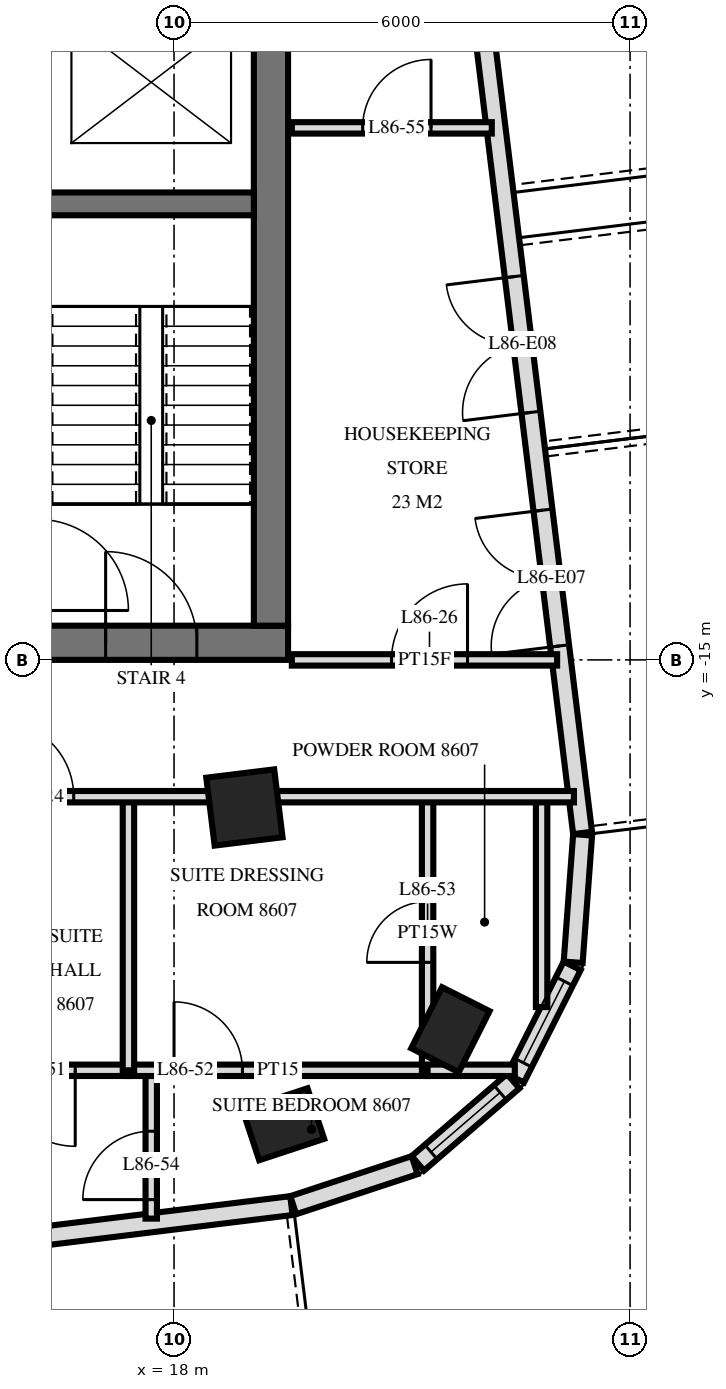
"""IFC4 building model, lengths in metres.
Left out: names, types, materials, properties, quantities, classifications, styles, units other than length and angle.
Written with IfcOpenShell. Run it as: python <this file> out.ifc"""

import sys

from ifc_helpers import new_model, si_unit, direction, frame, frame_2d, origin, origin_2d, place, context, subcontext, project, spatial, rectangle, extrude, element, fill, save


model = new_model("IFC4")
c1 = context("Model", 3, precision=1e-05, world=origin(), true_north=direction((0.0, 1.0)))
c2 = subcontext(c1, "Body", "Model", "MODEL_VIEW")
j1 = project(units=[si_unit("LENGTHUNIT", "METRE"), si_unit("PLANEANGLEUNIT", "RADIAN")], contexts=[c1])
p1 = place(None, origin())
s1 = spatial("IfcSite", under=j1, at=p1, CompositionType="ELEMENT")
p2 = place(p1, origin())
s2 = spatial("IfcBuilding", under=s1, at=p2, CompositionType="ELEMENT")
p3 = place(p2, frame((0.0, 0.0, 326.6)))
s3 = spatial("IfcBuildingStorey", under=s2, at=p3, CompositionType="ELEMENT", Elevation=326.6)
p4 = place(p3, frame((18.926, -16.942, 0.0), z_axis=(0.0, 0.0, 1.0), x_axis=(0.992546151641, 0.121869343405, 0.0)))
e1 = element("IfcColumn", 1, at=p4, inside=s3, PredefinedType="COLUMN", context=c2, shape_type="SweptSolid", body=[
    extrude(rectangle(XDim=0.9, YDim=0.9, at=origin_2d()), origin(), (0.0, 0.0, 1.0), 4.0),
])
for number, where, z_axis, x_axis in (
    (2, (19.438, -21.11, 0.0), (0.0, 0.0, 1.0), (0.95, 0.313, 0.0)),
    (3, (21.636, -19.866, 0.0), (0.0, 0.0, 1.0), (0.45, 0.893, 0.0)),
):
    element("IfcColumn", number, at=place(p3, frame(where, z_axis=z_axis, x_axis=x_axis)), inside=s3, PredefinedType="COLUMN", context=c2, shape_type="SweptSolid", body=[
        extrude(rectangle(XDim=0.9, YDim=0.7, at=origin_2d()), origin(), (0.0, 0.0, 1.0), 4.0),
    ])
p5 = place(p3, frame((10.0, -14.775, 0.0), z_axis=(0.0, 0.0, 1.0), x_axis=(1.0, 0.0, 0.0)))
e4 = element("IfcWall", 4, at=p5, inside=s3, PredefinedType="SHEAR", context=c2, shape_type="SweptSolid", body=[
    extrude(rectangle(XDim=9.5, YDim=0.45, at=frame_2d((4.75, 0.0))), origin(), (0.0, 0.0, 1.0), 4.0),
])
p6 = place(p5, frame((7.1, 0.0, 0.0)))
e5 = element("IfcOpeningElement", 5, at=p6, cuts=e4, PredefinedType="OPENING", context=c2, shape_type="SweptSolid", body=[
    extrude(rectangle(XDim=1.2, YDim=2.1, at=frame_2d((0.6, 1.05))), frame((0.0, 0.235, 0.0), z_axis=(0.0, -1.0, 0.0), x_axis=(1.0, 0.0, 0.0)), (0.0, 0.0, 1.0), 0.47),
])
p7 = place(p5, frame((4.15, 0.0, 0.0)))
e6 = element("IfcOpeningElement", 6, at=p7, cuts=e4, PredefinedType="OPENING", context=c2, shape_type="SweptSolid", body=[
    extrude(rectangle(XDim=1.1, YDim=2.1, at=frame_2d((0.55, 1.05))), frame((0.0, 0.235, 0.0), z_axis=(0.0, -1.0, 0.0), x_axis=(1.0, 0.0, 0.0)), (0.0, 0.0, 1.0), 0.47),
])
p8 = place(p3, frame((19.275, -14.55, 0.0), z_axis=(0.0, 0.0, 1.0), x_axis=(0.0, 1.0, 0.0)))
e7 = element("IfcWall", 7, at=p8, inside=s3, PredefinedType="SHEAR", context=c2, shape_type="SweptSolid", body=[
    extrude(rectangle(XDim=14.1, YDim=0.45, at=frame_2d((7.05, 0.0))), origin(), (0.0, 0.0, 1.0), 4.0),
])
p9 = place(p3, frame((10.35, -9.0, 0.0), z_axis=(0.0, 0.0, 1.0), x_axis=(1.0, 0.0, 0.0)))
e8 = element("IfcWall", 8, at=p9, inside=s3, PredefinedType="SHEAR", context=c2, shape_type="SweptSolid", body=[
    extrude(rectangle(XDim=8.7, YDim=0.3, at=frame_2d((4.35, 0.0))), origin(), (0.0, 0.0, 1.0), 4.0),
])
p10 = place(p9, frame((3.8, 0.0, 0.0)))
e9 = element("IfcOpeningElement", 9, at=p10, cuts=e8, PredefinedType="OPENING", context=c2, shape_type="SweptSolid", body=[
    extrude(rectangle(XDim=1.1, YDim=2.1, at=frame_2d((0.55, 1.05))), frame((0.0, 0.16, 0.0), z_axis=(0.0, -1.0, 0.0), x_axis=(1.0, 0.0, 0.0)), (0.0, 0.0, 1.0), 0.32),
])
p11 = place(p3, frame((-16.138, -26.561, 0.0), z_axis=(0.0, 0.0, 1.0), x_axis=(0.992546726876, 0.121864658405, 0.0)))
e10 = element("IfcWall", 10, at=p11, inside=s3, PredefinedType="SOLIDWALL", context=c2, shape_type="SweptSolid", body=[
    extrude(rectangle(XDim=35.951, YDim=0.25, at=frame_2d((17.975, 0.0))), origin(), (0.0, 0.0, 1.0), 3.72),
])
p12 = place(p11, frame((0.575, 0.0, 0.0)))
e11 = element("IfcOpeningElement", 11, at=p12, cuts=e10, PredefinedType="OPENING", context=c2, shape_type="SweptSolid", body=[
    extrude(rectangle(XDim=1.8, YDim=2.4, at=frame_2d((0.9, 1.2))), frame((0.0, 0.135, 0.0), z_axis=(0.0, -1.0, 0.0), x_axis=(1.0, 0.0, 0.0)), (0.0, 0.0, 1.0), 0.27),
])
p13 = place(p11, frame((6.576, 0.0, 0.0)))
e12 = element("IfcOpeningElement", 12, at=p13, cuts=e10, PredefinedType="OPENING", context=c2, shape_type="SweptSolid", body=[
    extrude(rectangle(XDim=1.8, YDim=2.4, at=frame_2d((0.9, 1.2))), frame((0.0, 0.135, 0.0), z_axis=(0.0, -1.0, 0.0), x_axis=(1.0, 0.0, 0.0)), (0.0, 0.0, 1.0), 0.27),
])
p14 = place(p11, frame((12.575, 0.0, 0.0)))
e13 = element("IfcOpeningElement", 13, at=p14, cuts=e10, PredefinedType="OPENING", context=c2, shape_type="SweptSolid", body=[
    extrude(rectangle(XDim=1.8, YDim=2.4, at=frame_2d((0.9, 1.2))), frame((0.0, 0.135, 0.0), z_axis=(0.0, -1.0, 0.0), x_axis=(1.0, 0.0, 0.0)), (0.0, 0.0, 1.0), 0.27),
])
p15 = place(p11, frame((18.575, 0.0, 0.0)))
e14 = element("IfcOpeningElement", 14, at=p15, cuts=e10, PredefinedType="OPENING", context=c2, shape_type="SweptSolid", body=[
    extrude(rectangle(XDim=1.8, YDim=2.4, at=frame_2d((0.9, 1.2))), frame((0.0, 0.135, 0.0), z_axis=(0.0, -1.0, 0.0), x_axis=(1.0, 0.0, 0.0)), (0.0, 0.0, 1.0), 0.27),
])
p16 = place(p11, frame((22.528, 0.0, 0.0)))
e15 = element("IfcOpeningElement", 15, at=p16, cuts=e10, PredefinedType="OPENING", context=c2, shape_type="SweptSolid", body=[
    extrude(rectangle(XDim=1.2, YDim=2.4, at=frame_2d((0.6, 1.2))), frame((0.0, 0.135, 0.0), z_axis=(0.0, -1.0, 0.0), x_axis=(1.0, 0.0, 0.0)), (0.0, 0.0, 1.0), 0.27),
])
p17 = place(p11, frame((25.923, 0.0, 0.0)))
e16 = element("IfcOpeningElement", 16, at=p17, cuts=e10, PredefinedType="OPENING", context=c2, shape_type="SweptSolid", body=[
    extrude(rectangle(XDim=1.8, YDim=2.4, at=frame_2d((0.9, 1.2))), frame((0.0, 0.135, 0.0), z_axis=(0.0, -1.0, 0.0), x_axis=(1.0, 0.0, 0.0)), (0.0, 0.0, 1.0), 0.27),
])
p18 = place(p11, frame((30.576, 0.0, 0.0)))
e17 = element("IfcOpeningElement", 17, at=p18, cuts=e10, PredefinedType="OPENING", context=c2, shape_type="SweptSolid", body=[
    extrude(rectangle(XDim=1.8, YDim=2.4, at=frame_2d((0.9, 1.2))), frame((0.0, 0.135, 0.0), z_axis=(0.0, -1.0, 0.0), x_axis=(1.0, 0.0, 0.0)), (0.0, 0.0, 1.0), 0.27),
])
p19 = place(p3, frame((19.568, -22.175, 0.0), z_axis=(0.0, 0.0, 1.0), x_axis=(0.949694735798, 0.313177120489, 0.0)))
e18 = element("IfcWall", 18, at=p19, inside=s3, PredefinedType="SOLIDWALL", context=c2, shape_type="SweptSolid", body=[
    extrude(rectangle(XDim=1.681, YDim=0.25, at=frame_2d((0.841, 0.0))), origin(), (0.0, 0.0, 1.0), 3.72),
])
p20 = place(p3, frame((21.208, -21.624, 0.0), z_axis=(0.0, 0.0, 1.0), x_axis=(0.757568315466, 0.652755886531, 0.0)))
e19 = element("IfcWall", 19, at=p20, inside=s3, PredefinedType="SOLIDWALL", context=c2, shape_type="SweptSolid", body=[
    extrude(rectangle(XDim=1.656, YDim=0.25, at=frame_2d((0.828, 0.0))), origin(), (0.0, 0.0, 1.0), 3.72),
])
p21 = place(p20, frame((0.228, 0.0, 0.9)))
e20 = element("IfcOpeningElement", 20, at=p21, cuts=e19, PredefinedType="OPENING", context=c2, shape_type="SweptSolid", body=[
    extrude(rectangle(XDim=1.2, YDim=1.5, at=frame_2d((0.6, 0.75))), frame((0.0, 0.135, 0.0), z_axis=(0.0, -1.0, 0.0), x_axis=(1.0, 0.0, 0.0)), (0.0, 0.0, 1.0), 0.27),
])
p22 = place(p3, frame((22.493, -20.505, 0.0), z_axis=(0.0, 0.0, 1.0), x_axis=(0.449982385812, 0.893037430604, 0.0)))
e21 = element("IfcWall", 21, at=p22, inside=s3, PredefinedType="SOLIDWALL", context=c2, shape_type="SweptSolid", body=[
    extrude(rectangle(XDim=1.656, YDim=0.25, at=frame_2d((0.828, 0.0))), origin(), (0.0, 0.0, 1.0), 3.72),
])
p23 = place(p22, frame((0.228, 0.0, 0.9)))
e22 = element("IfcOpeningElement", 22, at=p23, cuts=e21, PredefinedType="OPENING", context=c2, shape_type="SweptSolid", body=[
    extrude(rectangle(XDim=1.2, YDim=1.5, at=frame_2d((0.6, 0.75))), frame((0.0, 0.135, 0.0), z_axis=(0.0, -1.0, 0.0), x_axis=(1.0, 0.0, 0.0)), (0.0, 0.0, 1.0), 0.27),
])
p24 = place(p3, frame((23.251, -18.979, 0.0), z_axis=(0.0, 0.0, 1.0), x_axis=(0.074053534713, 0.997254267475, 0.0)))
e23 = element("IfcWall", 23, at=p24, inside=s3, PredefinedType="SOLIDWALL", context=c2, shape_type="SweptSolid", body=[
    extrude(rectangle(XDim=1.681, YDim=0.25, at=frame_2d((0.841, 0.0))), origin(), (0.0, 0.0, 1.0), 3.72),
])
p25 = place(p3, frame((23.375, -17.277, 0.0), z_axis=(0.0, 0.0, 1.0), x_axis=(-0.121862878281, 0.992546945437, 0.0)))
e24 = element("IfcWall", 24, at=p25, inside=s3, PredefinedType="SOLIDWALL", context=c2, shape_type="SweptSolid", body=[
    extrude(rectangle(XDim=19.151, YDim=0.25, at=frame_2d((9.575, 0.0))), origin(), (0.0, 0.0, 1.0), 3.72),
])
p26 = place(p25, frame((2.479, 0.0, 0.0)))
e25 = element("IfcOpeningElement", 25, at=p26, cuts=e24, PredefinedType="OPENING", context=c2, shape_type="SweptSolid", body=[
    extrude(rectangle(XDim=1.8, YDim=2.4, at=frame_2d((0.9, 1.2))), frame((0.0, 0.135, 0.0), z_axis=(0.0, -1.0, 0.0), x_axis=(1.0, 0.0, 0.0)), (0.0, 0.0, 1.0), 0.27),
])
p27 = place(p25, frame((5.575, 0.0, 0.0)))
e26 = element("IfcOpeningElement", 26, at=p27, cuts=e24, PredefinedType="OPENING", context=c2, shape_type="SweptSolid", body=[
    extrude(rectangle(XDim=1.8, YDim=2.4, at=frame_2d((0.9, 1.2))), frame((0.0, 0.135, 0.0), z_axis=(0.0, -1.0, 0.0), x_axis=(1.0, 0.0, 0.0)), (0.0, 0.0, 1.0), 0.27),
])
p28 = place(p25, frame((11.807, 0.0, 0.0)))
e27 = element("IfcOpeningElement", 27, at=p28, cuts=e24, PredefinedType="OPENING", context=c2, shape_type="SweptSolid", body=[
    extrude(rectangle(XDim=1.8, YDim=2.4, at=frame_2d((0.9, 1.2))), frame((0.0, 0.135, 0.0), z_axis=(0.0, -1.0, 0.0), x_axis=(1.0, 0.0, 0.0)), (0.0, 0.0, 1.0), 0.27),
])
p29 = place(p3, frame((22.836, -19.568, 0.0), z_axis=(0.0, 0.0, 1.0), x_axis=(0.0, 1.0, 0.0)))
e28 = element("IfcWall", 28, at=p29, inside=s3, PredefinedType="PLUMBINGWALL", context=c2, shape_type="SweptSolid", body=[
    extrude(rectangle(XDim=2.768, YDim=0.15, at=frame_2d((1.384, 0.0))), origin(), (0.0, 0.0, 1.0), 3.72),
])
p30 = place(p3, frame((21.336, -20.4, 0.0), z_axis=(0.0, 0.0, 1.0), x_axis=(0.0, 1.0, 0.0)))
e29 = element("IfcWall", 29, at=p30, inside=s3, PredefinedType="PLUMBINGWALL", context=c2, shape_type="SweptSolid", body=[
    extrude(rectangle(XDim=3.6, YDim=0.15, at=frame_2d((1.8, 0.0))), origin(), (0.0, 0.0, 1.0), 3.72),
])
p31 = place(p30, frame((1.42, 0.0, 0.0)))
e30 = element("IfcOpeningElement", 30, at=p31, cuts=e29, PredefinedType="OPENING", context=c2, shape_type="SweptSolid", body=[
    extrude(rectangle(XDim=0.8, YDim=2.1, at=frame_2d((0.4, 1.05))), frame((0.0, 0.085, 0.0), z_axis=(0.0, -1.0, 0.0), x_axis=(1.0, 0.0, 0.0)), (0.0, 0.0, 1.0), 0.17),
])
p32 = place(p3, frame((17.7, -22.351, 0.0), z_axis=(0.0, 0.0, 1.0), x_axis=(0.0, 1.0, 0.0)))
e31 = element("IfcWall", 31, at=p32, inside=s3, PredefinedType="PARTITIONING", context=c2, shape_type="SweptSolid", body=[
    extrude(rectangle(XDim=1.951, YDim=0.15, at=frame_2d((0.976, 0.0))), origin(), (0.0, 0.0, 1.0), 3.72),
])
p33 = place(p32, frame((0.25, 0.0, 0.0)))
e32 = element("IfcOpeningElement", 32, at=p33, cuts=e31, PredefinedType="OPENING", context=c2, shape_type="SweptSolid", body=[
    extrude(rectangle(XDim=0.9, YDim=2.1, at=frame_2d((0.45, 1.05))), frame((0.0, 0.085, 0.0), z_axis=(0.0, -1.0, 0.0), x_axis=(1.0, 0.0, 0.0)), (0.0, 0.0, 1.0), 0.17),
])
p34 = place(p3, frame((17.4, -20.4, 0.0), z_axis=(0.0, 0.0, 1.0), x_axis=(0.0, 1.0, 0.0)))
e33 = element("IfcWall", 33, at=p34, inside=s3, PredefinedType="PARTITIONING", context=c2, shape_type="SweptSolid", body=[
    extrude(rectangle(XDim=3.6, YDim=0.15, at=frame_2d((1.8, 0.0))), origin(), (0.0, 0.0, 1.0), 3.72),
])
p35 = place(p3, frame((15.0, -20.4, 0.0), z_axis=(0.0, 0.0, 1.0), x_axis=(1.0, 0.0, 0.0)))
e34 = element("IfcWall", 34, at=p35, inside=s3, PredefinedType="PARTITIONING", context=c2, shape_type="SweptSolid", body=[
    extrude(rectangle(XDim=2.4, YDim=0.15, at=frame_2d((1.2, 0.0))), origin(), (0.0, 0.0, 1.0), 3.72),
])
p36 = place(p35, frame((0.7, 0.0, 0.0)))
e35 = element("IfcOpeningElement", 35, at=p36, cuts=e34, PredefinedType="OPENING", context=c2, shape_type="SweptSolid", body=[
    extrude(rectangle(XDim=1.0, YDim=2.1, at=frame_2d((0.5, 1.05))), frame((0.0, 0.085, 0.0), z_axis=(0.0, -1.0, 0.0), x_axis=(1.0, 0.0, 0.0)), (0.0, 0.0, 1.0), 0.17),
])
p37 = place(p3, frame((17.4, -20.4, 0.0), z_axis=(0.0, 0.0, 1.0), x_axis=(1.0, 0.0, 0.0)))
e36 = element("IfcWall", 36, at=p37, inside=s3, PredefinedType="PARTITIONING", context=c2, shape_type="SweptSolid", body=[
    extrude(rectangle(XDim=3.936, YDim=0.15, at=frame_2d((1.968, 0.0))), origin(), (0.0, 0.0, 1.0), 3.72),
])
p38 = place(p37, frame((0.6, 0.0, 0.0)))
e37 = element("IfcOpeningElement", 37, at=p38, cuts=e36, PredefinedType="OPENING", context=c2, shape_type="SweptSolid", body=[
    extrude(rectangle(XDim=0.9, YDim=2.1, at=frame_2d((0.45, 1.05))), frame((0.0, 0.085, 0.0), z_axis=(0.0, -1.0, 0.0), x_axis=(1.0, 0.0, 0.0)), (0.0, 0.0, 1.0), 0.17),
])
p39 = place(p3, frame((21.336, -20.4, 0.0), z_axis=(0.0, 0.0, 1.0), x_axis=(1.0, 0.0, 0.0)))
e38 = element("IfcWall", 38, at=p39, inside=s3, PredefinedType="PLUMBINGWALL", context=c2, shape_type="SweptSolid", body=[
    extrude(rectangle(XDim=1.148, YDim=0.15, at=frame_2d((0.574, 0.0))), origin(), (0.0, 0.0, 1.0), 3.72),
])
p40 = place(p3, frame((-9.3, -16.8, 0.0), z_axis=(0.0, 0.0, 1.0), x_axis=(1.0, 0.0, 0.0)))
e39 = element("IfcWall", 39, at=p40, inside=s3, PredefinedType="PARTITIONING", context=c2, shape_type="SweptSolid", body=[
    extrude(rectangle(XDim=32.561, YDim=0.15, at=frame_2d((16.281, 0.0))), origin(), (0.0, 0.0, 1.0), 3.72),
])
p41 = place(p40, frame((0.4, 0.0, 0.0)))
e40 = element("IfcOpeningElement", 40, at=p41, cuts=e39, PredefinedType="OPENING", context=c2, shape_type="SweptSolid", body=[
    extrude(rectangle(XDim=1.0, YDim=2.1, at=frame_2d((0.5, 1.05))), frame((0.0, 0.085, 0.0), z_axis=(0.0, -1.0, 0.0), x_axis=(1.0, 0.0, 0.0)), (0.0, 0.0, 1.0), 0.17),
])
p42 = place(p40, frame((7.15, 0.0, 0.0)))
e41 = element("IfcOpeningElement", 41, at=p42, cuts=e39, PredefinedType="OPENING", context=c2, shape_type="SweptSolid", body=[
    extrude(rectangle(XDim=1.0, YDim=2.1, at=frame_2d((0.5, 1.05))), frame((0.0, 0.085, 0.0), z_axis=(0.0, -1.0, 0.0), x_axis=(1.0, 0.0, 0.0)), (0.0, 0.0, 1.0), 0.17),
])
p43 = place(p40, frame((9.7, 0.0, 0.0)))
e42 = element("IfcOpeningElement", 42, at=p43, cuts=e39, PredefinedType="OPENING", context=c2, shape_type="SweptSolid", body=[
    extrude(rectangle(XDim=1.0, YDim=2.1, at=frame_2d((0.5, 1.05))), frame((0.0, 0.085, 0.0), z_axis=(0.0, -1.0, 0.0), x_axis=(1.0, 0.0, 0.0)), (0.0, 0.0, 1.0), 0.17),
])
p44 = place(p40, frame((17.149, 0.0, 0.0)))
e43 = element("IfcOpeningElement", 43, at=p44, cuts=e39, PredefinedType="OPENING", context=c2, shape_type="SweptSolid", body=[
    extrude(rectangle(XDim=1.0, YDim=2.1, at=frame_2d((0.5, 1.05))), frame((0.0, 0.085, 0.0), z_axis=(0.0, -1.0, 0.0), x_axis=(1.0, 0.0, 0.0)), (0.0, 0.0, 1.0), 0.17),
])
p45 = place(p40, frame((18.45, 0.0, 0.0)))
e44 = element("IfcOpeningElement", 44, at=p45, cuts=e39, PredefinedType="OPENING", context=c2, shape_type="SweptSolid", body=[
    extrude(rectangle(XDim=1.0, YDim=2.1, at=frame_2d((0.5, 1.05))), frame((0.0, 0.085, 0.0), z_axis=(0.0, -1.0, 0.0), x_axis=(1.0, 0.0, 0.0)), (0.0, 0.0, 1.0), 0.17),
])
p46 = place(p40, frame((24.98, 0.0, 0.0)))
e45 = element("IfcOpeningElement", 45, at=p46, cuts=e39, PredefinedType="OPENING", context=c2, shape_type="SweptSolid", body=[
    extrude(rectangle(XDim=1.0, YDim=2.1, at=frame_2d((0.5, 1.05))), frame((0.0, 0.085, 0.0), z_axis=(0.0, -1.0, 0.0), x_axis=(1.0, 0.0, 0.0)), (0.0, 0.0, 1.0), 0.17),
])
p47 = place(p3, frame((19.55, -15.0, 0.0), z_axis=(0.0, 0.0, 1.0), x_axis=(1.0, 0.0, 0.0)))
e46 = element("IfcWall", 46, at=p47, inside=s3, PredefinedType="PARTITIONING", context=c2, shape_type="SweptSolid", body=[
    extrude(rectangle(XDim=3.49, YDim=0.15, at=frame_2d((1.745, 0.0))), origin(), (0.0, 0.0, 1.0), 3.72),
])
p48 = place(p47, frame((1.311, 0.0, 0.0)))
e47 = element("IfcOpeningElement", 47, at=p48, cuts=e46, PredefinedType="OPENING", context=c2, shape_type="SweptSolid", body=[
    extrude(rectangle(XDim=1.0, YDim=2.1, at=frame_2d((0.5, 1.05))), frame((0.0, 0.085, 0.0), z_axis=(0.0, -1.0, 0.0), x_axis=(1.0, 0.0, 0.0)), (0.0, 0.0, 1.0), 0.17),
])
p49 = place(p3, frame((19.55, -8.0, 0.0), z_axis=(0.0, 0.0, 1.0), x_axis=(1.0, 0.0, 0.0)))
e48 = element("IfcWall", 48, at=p49, inside=s3, PredefinedType="PARTITIONING", context=c2, shape_type="SweptSolid", body=[
    extrude(rectangle(XDim=2.631, YDim=0.15, at=frame_2d((1.315, 0.0))), origin(), (0.0, 0.0, 1.0), 3.253),
])
p50 = place(p49, frame((0.931, 0.0, 0.0)))
e49 = element("IfcOpeningElement", 49, at=p50, cuts=e48, PredefinedType="OPENING", context=c2, shape_type="SweptSolid", body=[
    extrude(rectangle(XDim=0.9, YDim=2.1, at=frame_2d((0.45, 1.05))), frame((0.0, 0.085, 0.0), z_axis=(0.0, -1.0, 0.0), x_axis=(1.0, 0.0, 0.0)), (0.0, 0.0, 1.0), 0.17),
])
p51 = place(p21, origin())
e50 = element("IfcWindow", 50, at=p51, inside=s3, PartitioningType="SINGLE_PANEL", PredefinedType="WINDOW", context=c2, shape_type="SweptSolid", body=[
    extrude(rectangle(XDim=1.2, YDim=1.5, at=frame_2d((0.6, 0.75))), frame((0.0, 0.03, 0.0), z_axis=(0.0, -1.0, 0.0), x_axis=(1.0, 0.0, 0.0)), (0.0, 0.0, 1.0), 0.06),
])
fill(e20, e50)
p52 = place(p23, origin())
e51 = element("IfcWindow", 51, at=p52, inside=s3, PartitioningType="SINGLE_PANEL", PredefinedType="WINDOW", context=c2, shape_type="SweptSolid", body=[
    extrude(rectangle(XDim=1.2, YDim=1.5, at=frame_2d((0.6, 0.75))), frame((0.0, 0.03, 0.0), z_axis=(0.0, -1.0, 0.0), x_axis=(1.0, 0.0, 0.0)), (0.0, 0.0, 1.0), 0.06),
])
fill(e22, e51)
p53 = place(p26, origin())
e52 = element("IfcDoor", 52, at=p53, inside=s3, OperationType="DOUBLE_DOOR_SINGLE_SWING", PredefinedType="DOOR", context=c2, shape_type="SweptSolid", body=[
    extrude(rectangle(XDim=1.8, YDim=2.4, at=frame_2d((0.9, 1.2))), frame((0.0, 0.025, 0.0), z_axis=(0.0, -1.0, 0.0), x_axis=(1.0, 0.0, 0.0)), (0.0, 0.0, 1.0), 0.05),
])
fill(e25, e52)
p54 = place(p27, origin())
e53 = element("IfcDoor", 53, at=p54, inside=s3, OperationType="DOUBLE_DOOR_SINGLE_SWING", PredefinedType="DOOR", context=c2, shape_type="SweptSolid", body=[
    extrude(rectangle(XDim=1.8, YDim=2.4, at=frame_2d((0.9, 1.2))), frame((0.0, 0.025, 0.0), z_axis=(0.0, -1.0, 0.0), x_axis=(1.0, 0.0, 0.0)), (0.0, 0.0, 1.0), 0.05),
])
fill(e26, e53)
p55 = place(p6, origin())
e54 = element("IfcDoor", 54, at=p55, inside=s3, OperationType="SINGLE_SWING_RIGHT", PredefinedType="DOOR", context=c2, shape_type="SweptSolid", body=[
    extrude(rectangle(XDim=1.2, YDim=2.1, at=frame_2d((0.6, 1.05))), frame((0.0, 0.025, 0.0), z_axis=(0.0, -1.0, 0.0), x_axis=(1.0, 0.0, 0.0)), (0.0, 0.0, 1.0), 0.05),
])
fill(e5, e54)
p56 = place(p46, origin())
e55 = element("IfcDoor", 55, at=p56, inside=s3, OperationType="SINGLE_SWING_RIGHT", PredefinedType="DOOR", context=c2, shape_type="SweptSolid", body=[
    extrude(rectangle(XDim=1.0, YDim=2.1, at=frame_2d((0.5, 1.05))), frame((0.0, 0.025, 0.0), z_axis=(0.0, -1.0, 0.0), x_axis=(1.0, 0.0, 0.0)), (0.0, 0.0, 1.0), 0.05),
])
fill(e45, e55)
p57 = place(p48, origin())
e56 = element("IfcDoor", 56, at=p57, inside=s3, OperationType="SINGLE_SWING_LEFT", PredefinedType="DOOR", context=c2, shape_type="SweptSolid", body=[
    extrude(rectangle(XDim=1.0, YDim=2.1, at=frame_2d((0.5, 1.05))), frame((0.0, 0.025, 0.0), z_axis=(0.0, -1.0, 0.0), x_axis=(1.0, 0.0, 0.0)), (0.0, 0.0, 1.0), 0.05),
])
fill(e47, e56)
p58 = place(p36, frame((0.5, 0.0, 0.0), z_axis=(0.0, 0.0, 1.0), x_axis=(-1.0, 0.0, 0.0)))
e57 = element("IfcDoor", 57, at=p58, inside=s3, OperationType="SINGLE_SWING_RIGHT", PredefinedType="DOOR", context=c2, shape_type="SweptSolid", body=[
    extrude(rectangle(XDim=1.0, YDim=2.1, at=frame_2d((0.0, 1.05))), frame((0.0, -0.025, 0.0), z_axis=(0.0, 1.0, 0.0), x_axis=(-1.0, 0.0, 0.0)), (0.0, 0.0, 1.0), 0.05),
])
fill(e35, e57)
p59 = place(p38, origin())
e58 = element("IfcDoor", 58, at=p59, inside=s3, OperationType="SINGLE_SWING_RIGHT", PredefinedType="DOOR", context=c2, shape_type="SweptSolid", body=[
    extrude(rectangle(XDim=0.9, YDim=2.1, at=frame_2d((0.45, 1.05))), frame((0.0, 0.025, 0.0), z_axis=(0.0, -1.0, 0.0), x_axis=(1.0, 0.0, 0.0)), (0.0, 0.0, 1.0), 0.05),
])
fill(e37, e58)
p60 = place(p31, origin())
e59 = element("IfcDoor", 59, at=p60, inside=s3, OperationType="SINGLE_SWING_RIGHT", PredefinedType="DOOR", context=c2, shape_type="SweptSolid", body=[
    extrude(rectangle(XDim=0.8, YDim=2.1, at=frame_2d((0.4, 1.05))), frame((0.0, 0.025, 0.0), z_axis=(0.0, -1.0, 0.0), x_axis=(1.0, 0.0, 0.0)), (0.0, 0.0, 1.0), 0.05),
])
fill(e30, e59)
p61 = place(p33, origin())
e60 = element("IfcDoor", 60, at=p61, inside=s3, OperationType="SINGLE_SWING_RIGHT", PredefinedType="DOOR", context=c2, shape_type="SweptSolid", body=[
    extrude(rectangle(XDim=0.9, YDim=2.1, at=frame_2d((0.45, 1.05))), frame((0.0, 0.025, 0.0), z_axis=(0.0, -1.0, 0.0), x_axis=(1.0, 0.0, 0.0)), (0.0, 0.0, 1.0), 0.05),
])
fill(e32, e60)
p62 = place(p50, origin())
e61 = element("IfcDoor", 61, at=p62, inside=s3, OperationType="SINGLE_SWING_LEFT", PredefinedType="DOOR", context=c2, shape_type="SweptSolid", body=[
    extrude(rectangle(XDim=0.9, YDim=2.1, at=frame_2d((0.45, 1.05))), frame((0.0, 0.025, 0.0), z_axis=(0.0, -1.0, 0.0), x_axis=(1.0, 0.0, 0.0)), (0.0, 0.0, 1.0), 0.05),
])
fill(e49, e61)
save(model, sys.argv[1])
